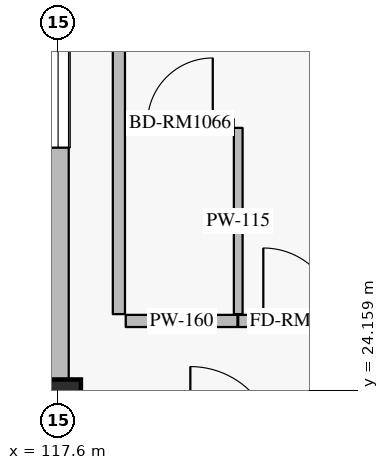
"""IFC4 building model, lengths in metres.
Left out: names, types, materials, properties, quantities, classifications, styles, units other than length and angle.
Written with IfcOpenShell. Run it as: python <this file> out.ifc"""

import sys

from ifc_helpers import new_model, si_unit, direction, frame, frame_2d, origin, origin_2d, place, context, subcontext, project, spatial, rectangle, extrude, element, fill, save


model = new_model("IFC4")
c1 = context("Model", 3, precision=1e-05, world=origin(), true_north=direction((0.0, 1.0)))
c2 = subcontext(c1, "Body", "Model", "MODEL_VIEW")
j1 = project(units=[si_unit("LENGTHUNIT", "METRE"), si_unit("PLANEANGLEUNIT", "RADIAN")], contexts=[c1])
p1 = place(None, origin())
s1 = spatial("IfcSite", under=j1, at=p1, CompositionType="ELEMENT")
p2 = place(p1, origin())
s2 = spatial("IfcBuilding", under=s1, at=p2, CompositionType="ELEMENT")
p3 = place(p2, frame((0.0, 0.0, 39.6)))
s3 = spatial("IfcBuildingStorey", under=s2, at=p3, CompositionType="ELEMENT", Elevation=39.6)
p4 = place(p3, frame((117.6, 24.0, 0.0), z_axis=(0.0, 0.0, 1.0), x_axis=(1.0, 0.0, 0.0)))
e1 = element("IfcColumn", 1, at=p4, inside=s3, PredefinedType="COLUMN", context=c2, shape_type="SweptSolid", body=[
    extrude(rectangle(XDim=0.6, YDim=0.6, at=origin_2d()), origin(), (0.0, 0.0, 1.0), 3.6),
])
p5 = place(p3, frame((117.6, 24.3, 0.0), z_axis=(0.0, 0.0, 1.0), x_axis=(0.0, 1.0, 0.0)))
e2 = element("IfcWall", 2, at=p5, inside=s3, PredefinedType="SOLIDWALL", context=c2, shape_type="SweptSolid", body=[
    extrude(rectangle(XDim=7.4, YDim=0.28, at=frame_2d((3.7, 0.0))), origin(), (0.0, 0.0, 1.0), 2.7),
])
p6 = place(p5, frame((3.05, 0.0, 0.5)))
e3 = element("IfcOpeningElement", 3, at=p6, cuts=e2, PredefinedType="OPENING", context=c2, shape_type="SweptSolid", body=[
    extrude(rectangle(XDim=1.3, YDim=1.65, at=frame_2d((0.65, 0.825))), frame((0.0, 0.15, 0.0), z_axis=(0.0, -1.0, 0.0), x_axis=(1.0, 0.0, 0.0)), (0.0, 0.0, 1.0), 0.3),
])
p7 = place(p3, frame((118.49, 25.07, 0.0), z_axis=(0.0, 0.0, 1.0), x_axis=(1.0, 0.0, 0.0)))
e4 = element("IfcWall", 4, at=p7, inside=s3, PredefinedType="PARTITIONING", context=c2, shape_type="SweptSolid", body=[
    extrude(rectangle(XDim=1.47, YDim=0.16, at=frame_2d((0.735, 0.0))), origin(), (0.0, 0.0, 1.0), 3.335),
])
p8 = place(p3, frame((119.97, 25.07, 0.0), z_axis=(0.0, 0.0, 1.0), x_axis=(1.0, 0.0, 0.0)))
e5 = element("IfcWall", 5, at=p8, inside=s3, PredefinedType="PARTITIONING", context=c2, shape_type="SweptSolid", body=[
    extrude(rectangle(XDim=1.62, YDim=0.16, at=frame_2d((0.81, 0.0))), origin(), (0.0, 0.0, 1.0), 3.335),
])
p9 = place(p8, frame((0.33, 0.0, 0.0)))
e6 = element("IfcOpeningElement", 6, at=p9, cuts=e5, PredefinedType="OPENING", context=c2, shape_type="SweptSolid", body=[
    extrude(rectangle(XDim=0.96, YDim=2.2, at=frame_2d((0.48, 1.1))), frame((0.0, 0.09, 0.0), z_axis=(0.0, -1.0, 0.0), x_axis=(1.0, 0.0, 0.0)), (0.0, 0.0, 1.0), 0.18),
])
p10 = place(p3, frame((119.97, 25.16, 0.0), z_axis=(0.0, 0.0, 1.0), x_axis=(0.0, 1.0, 0.0)))
e7 = element("IfcWall", 7, at=p10, inside=s3, PredefinedType="PARTITIONING", context=c2, shape_type="SweptSolid", body=[
    extrude(rectangle(XDim=2.45, YDim=0.115, at=frame_2d((1.225, 0.0))), origin(), (0.0, 0.0, 1.0), 3.335),
])
p11 = place(p3, frame((118.5, 27.67, 0.0), z_axis=(0.0, 0.0, 1.0), x_axis=(1.0, 0.0, 0.0)))
e8 = element("IfcWall", 8, at=p11, inside=s3, PredefinedType="PARTITIONING", context=c2, shape_type="SweptSolid", body=[
    extrude(rectangle(XDim=1.41, YDim=0.115, at=frame_2d((0.705, 0.0))), origin(), (0.0, 0.0, 1.0), 3.335),
])
p12 = place(p11, frame((0.275, 0.0, 0.0)))
e9 = element("IfcOpeningElement", 9, at=p12, cuts=e8, PredefinedType="OPENING", context=c2, shape_type="SweptSolid", body=[
    extrude(rectangle(XDim=0.86, YDim=2.12, at=frame_2d((0.43, 1.06))), frame((0.0, 0.067, 0.0), z_axis=(0.0, -1.0, 0.0), x_axis=(1.0, 0.0, 0.0)), (0.0, 0.0, 1.0), 0.135),
])
p13 = place(p3, frame((118.4, 25.16, 0.0), z_axis=(0.0, 0.0, 1.0), x_axis=(0.0, 1.0, 0.0)))
e10 = element("IfcWall", 10, at=p13, inside=s3, PredefinedType="PARTITIONING", context=c2, shape_type="SweptSolid", body=[
    extrude(rectangle(XDim=6.5, YDim=0.16, at=frame_2d((3.25, 0.0))), origin(), (0.0, 0.0, 1.0), 3.335),
])
p14 = place(p6, origin())
e11 = element("IfcWindow", 11, at=p14, inside=s3, PartitioningType="SINGLE_PANEL", PredefinedType="WINDOW", context=c2, shape_type="SweptSolid", body=[
    extrude(rectangle(XDim=1.3, YDim=1.65, at=frame_2d((0.65, 0.825))), frame((0.0, 0.03, 0.0), z_axis=(0.0, -1.0, 0.0), x_axis=(1.0, 0.0, 0.0)), (0.0, 0.0, 1.0), 0.06),
])
fill(e3, e11)
p15 = place(p9, origin())
e12 = element("IfcDoor", 12, at=p15, inside=s3, OperationType="SINGLE_SWING_LEFT", PredefinedType="DOOR", context=c2, shape_type="SweptSolid", body=[
    extrude(rectangle(XDim=0.96, YDim=2.2, at=frame_2d((0.48, 1.1))), frame((0.0, 0.025, 0.0), z_axis=(0.0, -1.0, 0.0), x_axis=(1.0, 0.0, 0.0)), (0.0, 0.0, 1.0), 0.05),
])
fill(e6, e12)
p16 = place(p12, origin())
e13 = element("IfcDoor", 13, at=p16, inside=s3, OperationType="SINGLE_SWING_RIGHT", PredefinedType="DOOR", context=c2, shape_type="SweptSolid", body=[
    extrude(rectangle(XDim=0.86, YDim=2.12, at=frame_2d((0.43, 1.06))), frame((0.0, 0.025, 0.0), z_axis=(0.0, -1.0, 0.0), x_axis=(1.0, 0.0, 0.0)), (0.0, 0.0, 1.0), 0.05),
])
fill(e9, e13)
save(model, sys.argv[1])
